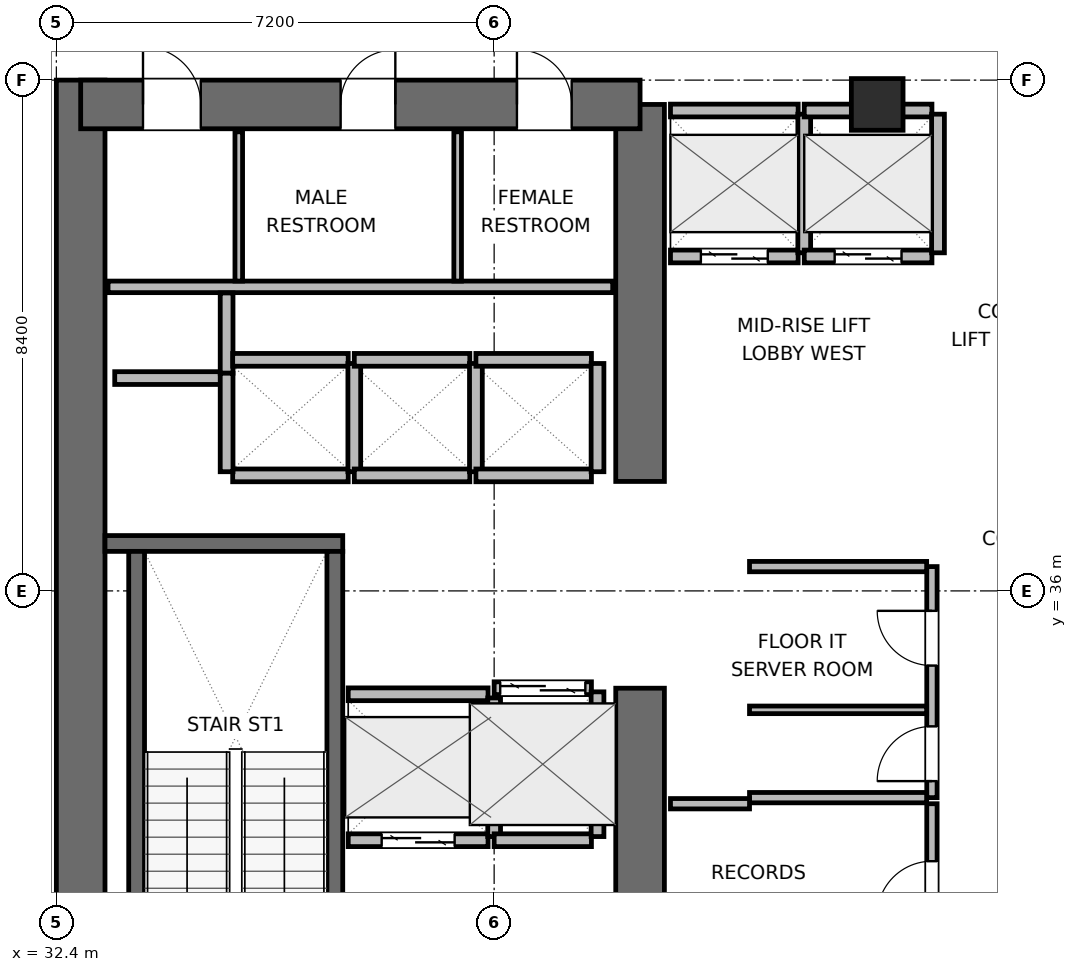
"""IFC4 building model, lengths in metres.
Left out: names, types, materials, properties, quantities, classifications, styles, units other than length and angle.
Written with IfcOpenShell. Run it as: python <this file> out.ifc"""

import sys

from ifc_helpers import new_model, si_unit, direction, frame, frame_2d, origin, origin_2d, place, context, subcontext, project, spatial, rectangle, extrude, element, fill, save


model = new_model("IFC4")
c1 = context("Model", 3, precision=1e-05, world=origin(), true_north=direction((0.0, 1.0)))
c2 = subcontext(c1, "Body", "Model", "MODEL_VIEW")
j1 = project(units=[si_unit("LENGTHUNIT", "METRE"), si_unit("PLANEANGLEUNIT", "RADIAN")], contexts=[c1])
p1 = place(None, origin())
s1 = spatial("IfcSite", under=j1, at=p1, CompositionType="ELEMENT")
p2 = place(p1, origin())
s2 = spatial("IfcBuilding", under=s1, at=p2, CompositionType="ELEMENT")
p3 = place(p2, frame((0.0, 0.0, 162.3)))
s3 = spatial("IfcBuildingStorey", under=s2, at=p3, CompositionType="ELEMENT", Elevation=162.3)
p4 = place(p3, frame((32.8, 27.6, 0.0), z_axis=(0.0, 0.0, 1.0), x_axis=(0.0, 1.0, 0.0)))
e1 = element("IfcWall", 1, at=p4, inside=s3, PredefinedType="SHEAR", context=c2, shape_type="SweptSolid", body=[
    extrude(rectangle(XDim=16.8, YDim=0.8, at=frame_2d((8.4, 0.0))), origin(), (0.0, 0.0, 1.0), 3.9),
])
p5 = place(p3, frame((42.0, 28.0, 0.0), z_axis=(0.0, 0.0, 1.0), x_axis=(0.0, 1.0, 0.0)))
e2 = element("IfcWall", 2, at=p5, inside=s3, PredefinedType="SHEAR", context=c2, shape_type="SweptSolid", body=[
    extrude(rectangle(XDim=6.4, YDim=0.8, at=frame_2d((3.2, 0.0))), origin(), (0.0, 0.0, 1.0), 3.9),
])
p6 = place(p3, frame((42.0, 37.8, 0.0), z_axis=(0.0, 0.0, 1.0), x_axis=(0.0, 1.0, 0.0)))
e3 = element("IfcWall", 3, at=p6, inside=s3, PredefinedType="SHEAR", context=c2, shape_type="SweptSolid", body=[
    extrude(rectangle(XDim=6.2, YDim=0.8, at=frame_2d((3.1, 0.0))), origin(), (0.0, 0.0, 1.0), 3.9),
])
p7 = place(p3, frame((32.8, 44.0, 0.0), z_axis=(0.0, 0.0, 1.0), x_axis=(1.0, 0.0, 0.0)))
e4 = element("IfcWall", 4, at=p7, inside=s3, PredefinedType="SHEAR", context=c2, shape_type="SweptSolid", body=[
    extrude(rectangle(XDim=9.2, YDim=0.8, at=frame_2d((4.6, 0.0))), origin(), (0.0, 0.0, 1.0), 3.9),
])
p8 = place(p7, frame((1.025, 0.0, 0.0)))
e5 = element("IfcOpeningElement", 5, at=p8, cuts=e4, PredefinedType="OPENING", context=c2, shape_type="SweptSolid", body=[
    extrude(rectangle(XDim=0.95, YDim=2.04, at=frame_2d((0.475, 1.02))), frame((0.0, 0.41, 0.0), z_axis=(0.0, -1.0, 0.0), x_axis=(1.0, 0.0, 0.0)), (0.0, 0.0, 1.0), 0.82),
])
p9 = place(p7, frame((4.275, 0.0, 0.0)))
e6 = element("IfcOpeningElement", 6, at=p9, cuts=e4, PredefinedType="OPENING", context=c2, shape_type="SweptSolid", body=[
    extrude(rectangle(XDim=0.9, YDim=2.02, at=frame_2d((0.45, 1.01))), frame((0.0, 0.41, 0.0), z_axis=(0.0, -1.0, 0.0), x_axis=(1.0, 0.0, 0.0)), (0.0, 0.0, 1.0), 0.82),
])
p10 = place(p7, frame((7.175, 0.0, 0.0)))
e7 = element("IfcOpeningElement", 7, at=p10, cuts=e4, PredefinedType="OPENING", context=c2, shape_type="SweptSolid", body=[
    extrude(rectangle(XDim=0.9, YDim=2.02, at=frame_2d((0.45, 1.01))), frame((0.0, 0.41, 0.0), z_axis=(0.0, -1.0, 0.0), x_axis=(1.0, 0.0, 0.0)), (0.0, 0.0, 1.0), 0.82),
])
p11 = place(p3, frame((33.2, 36.78, 0.0), z_axis=(0.0, 0.0, 1.0), x_axis=(1.0, 0.0, 0.0)))
e8 = element("IfcWall", 8, at=p11, inside=s3, PredefinedType="SHEAR", context=c2, shape_type="SweptSolid", body=[
    extrude(rectangle(XDim=3.91, YDim=0.26, at=frame_2d((1.955, 0.0))), origin(), (0.0, 0.0, 1.0), 3.9),
])
p12 = place(p3, frame((33.72, 29.05, 0.0), z_axis=(0.0, 0.0, 1.0), x_axis=(0.0, 1.0, 0.0)))
e9 = element("IfcWall", 9, at=p12, inside=s3, PredefinedType="SHEAR", context=c2, shape_type="SweptSolid", body=[
    extrude(rectangle(XDim=7.6, YDim=0.26, at=frame_2d((3.8, 0.0))), origin(), (0.0, 0.0, 1.0), 3.9),
])
p13 = place(p3, frame((36.98, 29.05, 0.0), z_axis=(0.0, 0.0, 1.0), x_axis=(0.0, 1.0, 0.0)))
e10 = element("IfcWall", 10, at=p13, inside=s3, PredefinedType="SHEAR", context=c2, shape_type="SweptSolid", body=[
    extrude(rectangle(XDim=7.6, YDim=0.26, at=frame_2d((3.8, 0.0))), origin(), (0.0, 0.0, 1.0), 3.9),
])
p14 = place(p13, frame((0.3, 0.0, 0.0)))
e11 = element("IfcOpeningElement", 11, at=p14, cuts=e10, PredefinedType="OPENING", context=c2, shape_type="SweptSolid", body=[
    extrude(rectangle(XDim=1.0, YDim=2.04, at=frame_2d((0.5, 1.02))), frame((0.0, 0.14, 0.0), z_axis=(0.0, -1.0, 0.0), x_axis=(1.0, 0.0, 0.0)), (0.0, 0.0, 1.0), 0.28),
])
p15 = place(p3, frame((45.9, 44.0, 0.0), z_axis=(0.0, 0.0, 1.0), x_axis=(1.0, 0.0, 0.0)))
e12 = element("IfcColumn", 12, at=p15, inside=s3, PredefinedType="COLUMN", context=c2, shape_type="SweptSolid", body=[
    extrude(rectangle(XDim=0.85, YDim=0.85, at=origin_2d()), origin(), (0.0, 0.0, 1.0), 3.9),
])
p16 = place(p3, frame((33.25, 41.0, 0.0), z_axis=(0.0, 0.0, 1.0), x_axis=(1.0, 0.0, 0.0)))
e13 = element("IfcWall", 13, at=p16, inside=s3, PredefinedType="PLUMBINGWALL", context=c2, shape_type="SweptSolid", body=[
    extrude(rectangle(XDim=8.3, YDim=0.19, at=frame_2d((4.15, 0.0))), origin(), (0.0, 0.0, 1.0), 3.68),
])
for number, where, z_axis, x_axis in (
    (14, (35.4, 41.095, 0.0), (0.0, 0.0, 1.0), (0.0, 1.0, 0.0)),
    (15, (39.0, 41.095, 0.0), (0.0, 0.0, 1.0), (0.0, 1.0, 0.0)),
):
    element("IfcWall", number, at=place(p3, frame(where, z_axis=z_axis, x_axis=x_axis)), inside=s3, PredefinedType="PARTITIONING", context=c2, shape_type="SweptSolid", body=[
        extrude(rectangle(XDim=2.455, YDim=0.125, at=frame_2d((1.228, 0.0))), origin(), (0.0, 0.0, 1.0), 3.68),
    ])
p17 = place(p3, frame((33.36, 39.5, 0.0), z_axis=(0.0, 0.0, 1.0), x_axis=(1.0, 0.0, 0.0)))
e16 = element("IfcWall", 16, at=p17, inside=s3, PredefinedType="PARTITIONING", context=c2, shape_type="SweptSolid", body=[
    extrude(rectangle(XDim=1.86, YDim=0.21, at=frame_2d((0.93, 0.0))), origin(), (0.0, 0.0, 1.0), 3.68),
])
p18 = place(p3, frame((35.2, 39.58, 0.0), z_axis=(0.0, 0.0, 1.0), x_axis=(0.0, 1.0, 0.0)))
e17 = element("IfcWall", 17, at=p18, inside=s3, PredefinedType="PARTITIONING", context=c2, shape_type="SweptSolid", body=[
    extrude(rectangle(XDim=1.32, YDim=0.21, at=frame_2d((0.66, 0.0))), origin(), (0.0, 0.0, 1.0), 3.68),
])
p19 = place(p3, frame((37.2, 31.9, 0.0), z_axis=(0.0, 0.0, 1.0), x_axis=(1.0, 0.0, 0.0)))
e18 = element("IfcWall", 18, at=p19, inside=s3, PredefinedType="PARTITIONING", context=c2, shape_type="SweptSolid", body=[
    extrude(rectangle(XDim=2.3, YDim=0.21, at=frame_2d((1.15, 0.0))), origin(), (0.0, 0.0, 1.0), 3.68),
])
p20 = place(p19, frame((0.55, 0.0, 0.0)))
e19 = element("IfcOpeningElement", 19, at=p20, cuts=e18, PredefinedType="OPENING", context=c2, shape_type="SweptSolid", body=[
    extrude(rectangle(XDim=1.2, YDim=2.04, at=frame_2d((0.6, 1.02))), frame((0.0, 0.115, 0.0), z_axis=(0.0, -1.0, 0.0), x_axis=(1.0, 0.0, 0.0)), (0.0, 0.0, 1.0), 0.23),
])
p21 = place(p3, frame((37.2, 34.3, 0.0), z_axis=(0.0, 0.0, 1.0), x_axis=(1.0, 0.0, 0.0)))
e20 = element("IfcWall", 20, at=p21, inside=s3, PredefinedType="PARTITIONING", context=c2, shape_type="SweptSolid", body=[
    extrude(rectangle(XDim=2.3, YDim=0.21, at=frame_2d((1.15, 0.0))), origin(), (0.0, 0.0, 1.0), 3.68),
])
p22 = place(p3, frame((39.6, 31.96, 0.0), z_axis=(0.0, 0.0, 1.0), x_axis=(0.0, 1.0, 0.0)))
e21 = element("IfcWall", 21, at=p22, inside=s3, PredefinedType="PARTITIONING", context=c2, shape_type="SweptSolid", body=[
    extrude(rectangle(XDim=2.28, YDim=0.21, at=frame_2d((1.14, 0.0))), origin(), (0.0, 0.0, 1.0), 3.68),
])
p23 = place(p3, frame((39.6, 34.4, 0.0), z_axis=(0.0, 0.0, 1.0), x_axis=(1.0, 0.0, 0.0)))
e22 = element("IfcWall", 22, at=p23, inside=s3, PredefinedType="PARTITIONING", context=c2, shape_type="SweptSolid", body=[
    extrude(rectangle(XDim=1.6, YDim=0.21, at=frame_2d((0.8, 0.0))), origin(), (0.0, 0.0, 1.0), 3.68),
])
p24 = place(p23, frame((0.1, 0.0, 0.0)))
e23 = element("IfcOpeningElement", 23, at=p24, cuts=e22, PredefinedType="OPENING", context=c2, shape_type="SweptSolid", body=[
    extrude(rectangle(XDim=1.4, YDim=2.06, at=frame_2d((0.7, 1.03))), frame((0.0, 0.115, 0.0), z_axis=(0.0, -1.0, 0.0), x_axis=(1.0, 0.0, 0.0)), (0.0, 0.0, 1.0), 0.23),
])
p25 = place(p3, frame((39.6, 31.9, 0.0), z_axis=(0.0, 0.0, 1.0), x_axis=(1.0, 0.0, 0.0)))
e24 = element("IfcWall", 24, at=p25, inside=s3, PredefinedType="PARTITIONING", context=c2, shape_type="SweptSolid", body=[
    extrude(rectangle(XDim=1.6, YDim=0.21, at=frame_2d((0.8, 0.0))), origin(), (0.0, 0.0, 1.0), 3.68),
])
p26 = place(p3, frame((41.3, 31.96, 0.0), z_axis=(0.0, 0.0, 1.0), x_axis=(0.0, 1.0, 0.0)))
e25 = element("IfcWall", 25, at=p26, inside=s3, PredefinedType="PARTITIONING", context=c2, shape_type="SweptSolid", body=[
    extrude(rectangle(XDim=2.38, YDim=0.21, at=frame_2d((1.19, 0.0))), origin(), (0.0, 0.0, 1.0), 3.68),
])
p27 = place(p3, frame((42.5, 41.5, 0.0), z_axis=(0.0, 0.0, 1.0), x_axis=(1.0, 0.0, 0.0)))
e26 = element("IfcWall", 26, at=p27, inside=s3, PredefinedType="PARTITIONING", context=c2, shape_type="SweptSolid", body=[
    extrude(rectangle(XDim=2.1, YDim=0.21, at=frame_2d((1.05, 0.0))), origin(), (0.0, 0.0, 1.0), 3.68),
])
p28 = place(p27, frame((0.5, 0.0, 0.0)))
e27 = element("IfcOpeningElement", 27, at=p28, cuts=e26, PredefinedType="OPENING", context=c2, shape_type="SweptSolid", body=[
    extrude(rectangle(XDim=1.1, YDim=2.04, at=frame_2d((0.55, 1.02))), frame((0.0, 0.115, 0.0), z_axis=(0.0, -1.0, 0.0), x_axis=(1.0, 0.0, 0.0)), (0.0, 0.0, 1.0), 0.23),
])
p29 = place(p3, frame((42.5, 43.9, 0.0), z_axis=(0.0, 0.0, 1.0), x_axis=(1.0, 0.0, 0.0)))
e28 = element("IfcWall", 28, at=p29, inside=s3, PredefinedType="PARTITIONING", context=c2, shape_type="SweptSolid", body=[
    extrude(rectangle(XDim=2.1, YDim=0.21, at=frame_2d((1.05, 0.0))), origin(), (0.0, 0.0, 1.0), 2.765),
])
p30 = place(p3, frame((44.7, 41.56, 0.0), z_axis=(0.0, 0.0, 1.0), x_axis=(0.0, 1.0, 0.0)))
e29 = element("IfcWall", 29, at=p30, inside=s3, PredefinedType="PARTITIONING", context=c2, shape_type="SweptSolid", body=[
    extrude(rectangle(XDim=2.28, YDim=0.21, at=frame_2d((1.14, 0.0))), origin(), (0.0, 0.0, 1.0), 3.68),
])
p31 = place(p3, frame((44.7, 41.5, 0.0), z_axis=(0.0, 0.0, 1.0), x_axis=(1.0, 0.0, 0.0)))
e30 = element("IfcWall", 30, at=p31, inside=s3, PredefinedType="PARTITIONING", context=c2, shape_type="SweptSolid", body=[
    extrude(rectangle(XDim=2.1, YDim=0.21, at=frame_2d((1.05, 0.0))), origin(), (0.0, 0.0, 1.0), 3.68),
])
p32 = place(p31, frame((0.5, 0.0, 0.0)))
e31 = element("IfcOpeningElement", 31, at=p32, cuts=e30, PredefinedType="OPENING", context=c2, shape_type="SweptSolid", body=[
    extrude(rectangle(XDim=1.1, YDim=2.04, at=frame_2d((0.55, 1.02))), frame((0.0, 0.115, 0.0), z_axis=(0.0, -1.0, 0.0), x_axis=(1.0, 0.0, 0.0)), (0.0, 0.0, 1.0), 0.23),
])
p33 = place(p3, frame((44.7, 43.9, 0.0), z_axis=(0.0, 0.0, 1.0), x_axis=(1.0, 0.0, 0.0)))
e32 = element("IfcWall", 32, at=p33, inside=s3, PredefinedType="PARTITIONING", context=c2, shape_type="SweptSolid", body=[
    extrude(rectangle(XDim=2.1, YDim=0.21, at=frame_2d((1.05, 0.0))), origin(), (0.0, 0.0, 1.0), 2.765),
])
p34 = place(p3, frame((46.9, 41.56, 0.0), z_axis=(0.0, 0.0, 1.0), x_axis=(0.0, 1.0, 0.0)))
e33 = element("IfcWall", 33, at=p34, inside=s3, PredefinedType="PARTITIONING", context=c2, shape_type="SweptSolid", body=[
    extrude(rectangle(XDim=2.28, YDim=0.21, at=frame_2d((1.14, 0.0))), origin(), (0.0, 0.0, 1.0), 3.68),
])
for number, where, z_axis, x_axis in (
    (34, (35.3, 37.9, 0.0), (0.0, 0.0, 1.0), (1.0, 0.0, 0.0)),
    (35, (35.3, 39.8, 0.0), (0.0, 0.0, 1.0), (1.0, 0.0, 0.0)),
):
    element("IfcWall", number, at=place(p3, frame(where, z_axis=z_axis, x_axis=x_axis)), inside=s3, PredefinedType="PARTITIONING", context=c2, shape_type="SweptSolid", body=[
        extrude(rectangle(XDim=1.9, YDim=0.21, at=frame_2d((0.95, 0.0))), origin(), (0.0, 0.0, 1.0), 3.68),
    ])
p35 = place(p3, frame((35.2, 37.96, 0.0), z_axis=(0.0, 0.0, 1.0), x_axis=(0.0, 1.0, 0.0)))
e36 = element("IfcWall", 36, at=p35, inside=s3, PredefinedType="PARTITIONING", context=c2, shape_type="SweptSolid", body=[
    extrude(rectangle(XDim=1.62, YDim=0.21, at=frame_2d((0.81, 0.0))), origin(), (0.0, 0.0, 1.0), 3.68),
])
p36 = place(p3, frame((37.3, 37.96, 0.0), z_axis=(0.0, 0.0, 1.0), x_axis=(0.0, 1.0, 0.0)))
e37 = element("IfcWall", 37, at=p36, inside=s3, PredefinedType="PARTITIONING", context=c2, shape_type="SweptSolid", body=[
    extrude(rectangle(XDim=1.78, YDim=0.21, at=frame_2d((0.89, 0.0))), origin(), (0.0, 0.0, 1.0), 3.68),
])
for number, where, z_axis, x_axis in (
    (38, (37.3, 37.9, 0.0), (0.0, 0.0, 1.0), (1.0, 0.0, 0.0)),
    (39, (37.3, 39.8, 0.0), (0.0, 0.0, 1.0), (1.0, 0.0, 0.0)),
):
    element("IfcWall", number, at=place(p3, frame(where, z_axis=z_axis, x_axis=x_axis)), inside=s3, PredefinedType="PARTITIONING", context=c2, shape_type="SweptSolid", body=[
        extrude(rectangle(XDim=1.9, YDim=0.21, at=frame_2d((0.95, 0.0))), origin(), (0.0, 0.0, 1.0), 3.68),
    ])
p37 = place(p3, frame((39.3, 37.96, 0.0), z_axis=(0.0, 0.0, 1.0), x_axis=(0.0, 1.0, 0.0)))
e40 = element("IfcWall", 40, at=p37, inside=s3, PredefinedType="PARTITIONING", context=c2, shape_type="SweptSolid", body=[
    extrude(rectangle(XDim=1.78, YDim=0.21, at=frame_2d((0.89, 0.0))), origin(), (0.0, 0.0, 1.0), 3.68),
])
for number, where, z_axis, x_axis in (
    (41, (39.3, 37.9, 0.0), (0.0, 0.0, 1.0), (1.0, 0.0, 0.0)),
    (42, (39.3, 39.8, 0.0), (0.0, 0.0, 1.0), (1.0, 0.0, 0.0)),
):
    element("IfcWall", number, at=place(p3, frame(where, z_axis=z_axis, x_axis=x_axis)), inside=s3, PredefinedType="PARTITIONING", context=c2, shape_type="SweptSolid", body=[
        extrude(rectangle(XDim=1.9, YDim=0.21, at=frame_2d((0.95, 0.0))), origin(), (0.0, 0.0, 1.0), 3.68),
    ])
p38 = place(p3, frame((41.3, 37.96, 0.0), z_axis=(0.0, 0.0, 1.0), x_axis=(0.0, 1.0, 0.0)))
e43 = element("IfcWall", 43, at=p38, inside=s3, PredefinedType="PARTITIONING", context=c2, shape_type="SweptSolid", body=[
    extrude(rectangle(XDim=1.78, YDim=0.21, at=frame_2d((0.89, 0.0))), origin(), (0.0, 0.0, 1.0), 3.68),
])
p39 = place(p3, frame((46.8, 32.6, 0.0), z_axis=(0.0, 0.0, 1.0), x_axis=(0.0, 1.0, 0.0)))
e44 = element("IfcWall", 44, at=p39, inside=s3, PredefinedType="PARTITIONING", context=c2, shape_type="SweptSolid", body=[
    extrude(rectangle(XDim=3.8, YDim=0.17, at=frame_2d((1.9, 0.0))), origin(), (0.0, 0.0, 1.0), 3.68),
])
p40 = place(p39, frame((0.272, 0.0, 0.0)))
e45 = element("IfcOpeningElement", 45, at=p40, cuts=e44, PredefinedType="OPENING", context=c2, shape_type="SweptSolid", body=[
    extrude(rectangle(XDim=0.9, YDim=2.02, at=frame_2d((0.45, 1.01))), frame((0.0, 0.095, 0.0), z_axis=(0.0, -1.0, 0.0), x_axis=(1.0, 0.0, 0.0)), (0.0, 0.0, 1.0), 0.19),
])
p41 = place(p39, frame((2.172, 0.0, 0.0)))
e46 = element("IfcOpeningElement", 46, at=p41, cuts=e44, PredefinedType="OPENING", context=c2, shape_type="SweptSolid", body=[
    extrude(rectangle(XDim=0.9, YDim=2.02, at=frame_2d((0.45, 1.01))), frame((0.0, 0.095, 0.0), z_axis=(0.0, -1.0, 0.0), x_axis=(1.0, 0.0, 0.0)), (0.0, 0.0, 1.0), 0.19),
])
for number, where, z_axis, x_axis in (
    (47, (43.8, 32.6, 0.0), (0.0, 0.0, 1.0), (1.0, 0.0, 0.0)),
    (48, (43.8, 36.4, 0.0), (0.0, 0.0, 1.0), (1.0, 0.0, 0.0)),
):
    element("IfcWall", number, at=place(p3, frame(where, z_axis=z_axis, x_axis=x_axis)), inside=s3, PredefinedType="PARTITIONING", context=c2, shape_type="SweptSolid", body=[
        extrude(rectangle(XDim=2.913, YDim=0.17, at=frame_2d((1.457, 0.0))), origin(), (0.0, 0.0, 1.0), 3.68),
    ])
p42 = place(p3, frame((43.8, 34.044, 0.0), z_axis=(0.0, 0.0, 1.0), x_axis=(1.0, 0.0, 0.0)))
e49 = element("IfcWall", 49, at=p42, inside=s3, PredefinedType="PARTITIONING", context=c2, shape_type="SweptSolid", body=[
    extrude(rectangle(XDim=2.913, YDim=0.125, at=frame_2d((1.457, 0.0))), origin(), (0.0, 0.0, 1.0), 3.68),
])
p43 = place(p3, frame((46.8, 28.0, 0.0), z_axis=(0.0, 0.0, 1.0), x_axis=(0.0, 1.0, 0.0)))
e50 = element("IfcWall", 50, at=p43, inside=s3, PredefinedType="PARTITIONING", context=c2, shape_type="SweptSolid", body=[
    extrude(rectangle(XDim=4.5, YDim=0.17, at=frame_2d((2.25, 0.0))), origin(), (0.0, 0.0, 1.0), 3.68),
])
p44 = place(p43, frame((0.605, 0.0, 0.0)))
e51 = element("IfcOpeningElement", 51, at=p44, cuts=e50, PredefinedType="OPENING", context=c2, shape_type="SweptSolid", body=[
    extrude(rectangle(XDim=0.9, YDim=2.02, at=frame_2d((0.45, 1.01))), frame((0.0, 0.095, 0.0), z_axis=(0.0, -1.0, 0.0), x_axis=(1.0, 0.0, 0.0)), (0.0, 0.0, 1.0), 0.19),
])
p45 = place(p43, frame((2.655, 0.0, 0.0)))
e52 = element("IfcOpeningElement", 52, at=p45, cuts=e50, PredefinedType="OPENING", context=c2, shape_type="SweptSolid", body=[
    extrude(rectangle(XDim=0.9, YDim=2.02, at=frame_2d((0.45, 1.01))), frame((0.0, 0.095, 0.0), z_axis=(0.0, -1.0, 0.0), x_axis=(1.0, 0.0, 0.0)), (0.0, 0.0, 1.0), 0.19),
])
p46 = place(p3, frame((42.5, 32.5, 0.0), z_axis=(0.0, 0.0, 1.0), x_axis=(1.0, 0.0, 0.0)))
e53 = element("IfcWall", 53, at=p46, inside=s3, PredefinedType="PARTITIONING", context=c2, shape_type="SweptSolid", body=[
    extrude(rectangle(XDim=1.3, YDim=0.17, at=frame_2d((0.65, 0.0))), origin(), (0.0, 0.0, 1.0), 3.68),
])
p47 = place(p20, origin())
e54 = element("IfcDoor", 54, at=p47, inside=s3, OperationType="DOUBLE_DOOR_SLIDING", PredefinedType="DOOR", context=c2, shape_type="SweptSolid", body=[
    extrude(rectangle(XDim=1.2, YDim=2.04, at=frame_2d((0.6, 1.02))), frame((0.0, 0.025, 0.0), z_axis=(0.0, -1.0, 0.0), x_axis=(1.0, 0.0, 0.0)), (0.0, 0.0, 1.0), 0.05),
])
fill(e19, e54)
p48 = place(p24, origin())
e55 = element("IfcDoor", 55, at=p48, inside=s3, OperationType="DOUBLE_DOOR_SLIDING", PredefinedType="DOOR", context=c2, shape_type="SweptSolid", body=[
    extrude(rectangle(XDim=1.4, YDim=2.06, at=frame_2d((0.7, 1.03))), frame((0.0, 0.025, 0.0), z_axis=(0.0, -1.0, 0.0), x_axis=(1.0, 0.0, 0.0)), (0.0, 0.0, 1.0), 0.05),
])
fill(e23, e55)
p49 = place(p28, origin())
e56 = element("IfcDoor", 56, at=p49, inside=s3, OperationType="DOUBLE_DOOR_SLIDING", PredefinedType="DOOR", context=c2, shape_type="SweptSolid", body=[
    extrude(rectangle(XDim=1.1, YDim=2.04, at=frame_2d((0.55, 1.02))), frame((0.0, 0.025, 0.0), z_axis=(0.0, -1.0, 0.0), x_axis=(1.0, 0.0, 0.0)), (0.0, 0.0, 1.0), 0.05),
])
fill(e27, e56)
p50 = place(p32, origin())
e57 = element("IfcDoor", 57, at=p50, inside=s3, OperationType="DOUBLE_DOOR_SLIDING", PredefinedType="DOOR", context=c2, shape_type="SweptSolid", body=[
    extrude(rectangle(XDim=1.1, YDim=2.04, at=frame_2d((0.55, 1.02))), frame((0.0, 0.025, 0.0), z_axis=(0.0, -1.0, 0.0), x_axis=(1.0, 0.0, 0.0)), (0.0, 0.0, 1.0), 0.05),
])
fill(e31, e57)
p51 = place(p8, origin())
e58 = element("IfcDoor", 58, at=p51, inside=s3, OperationType="SINGLE_SWING_LEFT", PredefinedType="DOOR", context=c2, shape_type="SweptSolid", body=[
    extrude(rectangle(XDim=0.95, YDim=2.04, at=frame_2d((0.475, 1.02))), frame((0.0, 0.025, 0.0), z_axis=(0.0, -1.0, 0.0), x_axis=(1.0, 0.0, 0.0)), (0.0, 0.0, 1.0), 0.05),
])
fill(e5, e58)
p52 = place(p9, origin())
e59 = element("IfcDoor", 59, at=p52, inside=s3, OperationType="SINGLE_SWING_RIGHT", PredefinedType="DOOR", context=c2, shape_type="SweptSolid", body=[
    extrude(rectangle(XDim=0.9, YDim=2.02, at=frame_2d((0.45, 1.01))), frame((0.0, 0.025, 0.0), z_axis=(0.0, -1.0, 0.0), x_axis=(1.0, 0.0, 0.0)), (0.0, 0.0, 1.0), 0.05),
])
fill(e6, e59)
p53 = place(p10, origin())
e60 = element("IfcDoor", 60, at=p53, inside=s3, OperationType="SINGLE_SWING_LEFT", PredefinedType="DOOR", context=c2, shape_type="SweptSolid", body=[
    extrude(rectangle(XDim=0.9, YDim=2.02, at=frame_2d((0.45, 1.01))), frame((0.0, 0.025, 0.0), z_axis=(0.0, -1.0, 0.0), x_axis=(1.0, 0.0, 0.0)), (0.0, 0.0, 1.0), 0.05),
])
fill(e7, e60)
p54 = place(p40, origin())
e61 = element("IfcDoor", 61, at=p54, inside=s3, OperationType="SINGLE_SWING_LEFT", PredefinedType="DOOR", context=c2, shape_type="SweptSolid", body=[
    extrude(rectangle(XDim=0.9, YDim=2.02, at=frame_2d((0.45, 1.01))), frame((0.0, 0.025, 0.0), z_axis=(0.0, -1.0, 0.0), x_axis=(1.0, 0.0, 0.0)), (0.0, 0.0, 1.0), 0.05),
])
fill(e45, e61)
p55 = place(p41, origin())
e62 = element("IfcDoor", 62, at=p55, inside=s3, OperationType="SINGLE_SWING_RIGHT", PredefinedType="DOOR", context=c2, shape_type="SweptSolid", body=[
    extrude(rectangle(XDim=0.9, YDim=2.02, at=frame_2d((0.45, 1.01))), frame((0.0, 0.025, 0.0), z_axis=(0.0, -1.0, 0.0), x_axis=(1.0, 0.0, 0.0)), (0.0, 0.0, 1.0), 0.05),
])
fill(e46, e62)
p56 = place(p45, origin())
e63 = element("IfcDoor", 63, at=p56, inside=s3, OperationType="SINGLE_SWING_LEFT", PredefinedType="DOOR", context=c2, shape_type="SweptSolid", body=[
    extrude(rectangle(XDim=0.9, YDim=2.02, at=frame_2d((0.45, 1.01))), frame((0.0, 0.025, 0.0), z_axis=(0.0, -1.0, 0.0), x_axis=(1.0, 0.0, 0.0)), (0.0, 0.0, 1.0), 0.05),
])
fill(e52, e63)
save(model, sys.argv[1])
